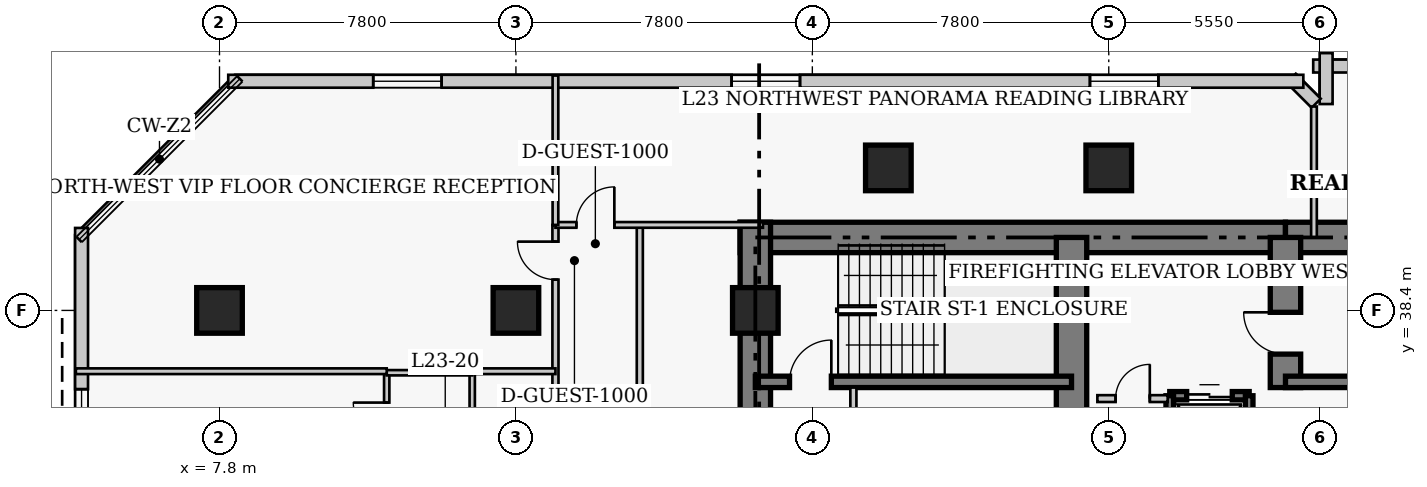
"""IFC4 building model, lengths in metres.
Left out: names, types, materials, properties, quantities, classifications, styles, units other than length and angle.
Written with IfcOpenShell. Run it as: python <this file> out.ifc"""

import sys

from ifc_helpers import new_model, si_unit, direction, frame, frame_2d, origin, origin_2d, place, context, subcontext, project, spatial, rectangle, extrude, element, fill, save


model = new_model("IFC4")
c1 = context("Model", 3, precision=1e-05, world=origin(), true_north=direction((0.0, 1.0)))
c2 = subcontext(c1, "Body", "Model", "MODEL_VIEW")
j1 = project(units=[si_unit("LENGTHUNIT", "METRE"), si_unit("PLANEANGLEUNIT", "RADIAN")], contexts=[c1])
p1 = place(None, origin())
s1 = spatial("IfcSite", under=j1, at=p1, CompositionType="ELEMENT")
p2 = place(p1, origin())
s2 = spatial("IfcBuilding", under=s1, at=p2, CompositionType="ELEMENT")
p3 = place(p2, frame((0.0, 0.0, 95.6)))
s3 = spatial("IfcBuildingStorey", under=s2, at=p3, CompositionType="ELEMENT", Elevation=95.6)
p4 = place(p3, frame((21.5, 40.32, 0.0), z_axis=(0.0, 0.0, 1.0), x_axis=(1.0, 0.0, 0.0)))
e1 = element("IfcWall", 1, at=p4, inside=s3, PredefinedType="SHEAR", context=c2, shape_type="SweptSolid", body=[
    extrude(rectangle(XDim=14.35, YDim=0.8, at=frame_2d((7.175, 0.0))), origin(), (0.0, 0.0, 1.0), 3.8),
])
p5 = place(p3, frame((35.85, 40.32, 0.0), z_axis=(0.0, 0.0, 1.0), x_axis=(1.0, 0.0, 0.0)))
e2 = element("IfcWall", 2, at=p5, inside=s3, PredefinedType="SHEAR", context=c2, shape_type="SweptSolid", body=[
    extrude(rectangle(XDim=12.6, YDim=0.8, at=frame_2d((6.3, 0.0))), origin(), (0.0, 0.0, 1.0), 3.8),
])
p6 = place(p3, frame((21.9, 27.05, 0.0), z_axis=(0.0, 0.0, 1.0), x_axis=(0.0, 1.0, 0.0)))
e3 = element("IfcWall", 3, at=p6, inside=s3, PredefinedType="SHEAR", context=c2, shape_type="SweptSolid", body=[
    extrude(rectangle(XDim=13.67, YDim=0.8, at=frame_2d((6.835, 0.0))), origin(), (0.0, 0.0, 1.0), 3.8),
])
p7 = place(p3, frame((30.22, 33.15, 0.0), z_axis=(0.0, 0.0, 1.0), x_axis=(0.0, 1.0, 0.0)))
e4 = element("IfcWall", 4, at=p7, inside=s3, PredefinedType="SHEAR", context=c2, shape_type="SweptSolid", body=[
    extrude(rectangle(XDim=7.17, YDim=0.8, at=frame_2d((3.585, 0.0))), origin(), (0.0, 0.0, 1.0), 3.8),
])
p8 = place(p3, frame((35.85, 36.37, 0.0), z_axis=(0.0, 0.0, 1.0), x_axis=(0.0, 1.0, 0.0)))
e5 = element("IfcWall", 5, at=p8, inside=s3, PredefinedType="SHEAR", context=c2, shape_type="SweptSolid", body=[
    extrude(rectangle(XDim=3.95, YDim=0.8, at=frame_2d((1.975, 0.0))), origin(), (0.0, 0.0, 1.0), 3.8),
])
p9 = place(p8, frame((0.88, 0.0, 0.0)))
e6 = element("IfcOpeningElement", 6, at=p9, cuts=e5, PredefinedType="OPENING", context=c2, shape_type="SweptSolid", body=[
    extrude(rectangle(XDim=1.1, YDim=2.15, at=frame_2d((0.55, 1.075))), frame((0.0, 0.41, 0.0), z_axis=(0.0, -1.0, 0.0), x_axis=(1.0, 0.0, 0.0)), (0.0, 0.0, 1.0), 0.82),
])
p10 = place(p3, frame((21.9, 36.52, 0.0), z_axis=(0.0, 0.0, 1.0), x_axis=(1.0, 0.0, 0.0)))
e7 = element("IfcWall", 7, at=p10, inside=s3, PredefinedType="SHEAR", context=c2, shape_type="SweptSolid", body=[
    extrude(rectangle(XDim=8.32, YDim=0.3, at=frame_2d((4.16, 0.0))), origin(), (0.0, 0.0, 1.0), 3.8),
])
p11 = place(p10, frame((0.9, 0.0, 0.0)))
e8 = element("IfcOpeningElement", 8, at=p11, cuts=e7, PredefinedType="OPENING", context=c2, shape_type="SweptSolid", body=[
    extrude(rectangle(XDim=1.1, YDim=2.15, at=frame_2d((0.55, 1.075))), frame((0.0, 0.16, 0.0), z_axis=(0.0, -1.0, 0.0), x_axis=(1.0, 0.0, 0.0)), (0.0, 0.0, 1.0), 0.32),
])
p12 = place(p3, frame((35.85, 36.52, 0.0), z_axis=(0.0, 0.0, 1.0), x_axis=(1.0, 0.0, 0.0)))
e9 = element("IfcWall", 9, at=p12, inside=s3, PredefinedType="SHEAR", context=c2, shape_type="SweptSolid", body=[
    extrude(rectangle(XDim=8.33, YDim=0.3, at=frame_2d((4.165, 0.0))), origin(), (0.0, 0.0, 1.0), 3.8),
])
for number, where, z_axis, x_axis in (
    (10, (7.8, 38.4, 0.0), (0.0, 0.0, 1.0), (1.0, 0.0, 0.0)),
    (11, (15.6, 38.4, 0.0), (0.0, 0.0, 1.0), (1.0, 0.0, 0.0)),
    (12, (21.9, 38.4, 0.0), (0.0, 0.0, 1.0), (1.0, 0.0, 0.0)),
    (13, (25.4, 42.15, 0.0), (0.0, 0.0, 1.0), (1.0, 0.0, 0.0)),
    (14, (31.2, 42.15, 0.0), (0.0, 0.0, 1.0), (1.0, 0.0, 0.0)),
):
    element("IfcColumn", number, at=place(p3, frame(where, z_axis=z_axis, x_axis=x_axis)), inside=s3, PredefinedType="COLUMN", context=c2, shape_type="SweptSolid", body=[
        extrude(rectangle(XDim=1.2, YDim=1.2, at=origin_2d()), origin(), (0.0, 0.0, 1.0), 3.8),
    ])
p13 = place(p3, frame((41.42, 44.83, 0.0), z_axis=(0.0, 0.0, 1.0), x_axis=(-1.0, 0.0, 0.0)))
e15 = element("IfcWall", 15, at=p13, inside=s3, PredefinedType="SOLIDWALL", context=c2, shape_type="SweptSolid", body=[
    extrude(rectangle(XDim=4.84, YDim=0.34, at=frame_2d((2.42, 0.0))), origin(), (0.0, 0.0, 1.0), 3.54),
])
p14 = place(p13, frame((1.52, 0.0, 0.85)))
e16 = element("IfcOpeningElement", 16, at=p14, cuts=e15, PredefinedType="OPENING", context=c2, shape_type="SweptSolid", body=[
    extrude(rectangle(XDim=1.8, YDim=1.8, at=frame_2d((0.9, 0.9))), frame((0.0, 0.18, 0.0), z_axis=(0.0, -1.0, 0.0), x_axis=(1.0, 0.0, 0.0)), (0.0, 0.0, 1.0), 0.36),
])
p15 = place(p3, frame((36.92, 45.17, 0.0), z_axis=(0.0, 0.0, 1.0), x_axis=(0.0, -1.0, 0.0)))
e17 = element("IfcWall", 17, at=p15, inside=s3, PredefinedType="SOLIDWALL", context=c2, shape_type="SweptSolid", body=[
    extrude(rectangle(XDim=1.34, YDim=0.34, at=frame_2d((0.67, 0.0))), origin(), (0.0, 0.0, 1.0), 3.54),
])
p16 = place(p3, frame((36.658, 43.852, 0.0), z_axis=(0.0, 0.0, 1.0), x_axis=(-0.707238225886, 0.706975312048, 0.0)))
e18 = element("IfcWall", 18, at=p16, inside=s3, PredefinedType="SOLIDWALL", context=c2, shape_type="SweptSolid", body=[
    extrude(rectangle(XDim=0.929, YDim=0.34, at=frame_2d((0.464, 0.0))), origin(), (0.0, 0.0, 1.0), 3.54),
])
p17 = place(p3, frame((36.32, 44.43, 0.0), z_axis=(0.0, 0.0, 1.0), x_axis=(-1.0, 0.0, 0.0)))
e19 = element("IfcWall", 19, at=p17, inside=s3, PredefinedType="SOLIDWALL", context=c2, shape_type="SweptSolid", body=[
    extrude(rectangle(XDim=28.29, YDim=0.34, at=frame_2d((14.145, 0.0))), origin(), (0.0, 0.0, 1.0), 3.54),
])
p18 = place(p17, frame((3.815, 0.0, 0.85)))
e20 = element("IfcOpeningElement", 20, at=p18, cuts=e19, PredefinedType="OPENING", context=c2, shape_type="SweptSolid", body=[
    extrude(rectangle(XDim=1.8, YDim=1.8, at=frame_2d((0.9, 0.9))), frame((0.0, 0.18, 0.0), z_axis=(0.0, -1.0, 0.0), x_axis=(1.0, 0.0, 0.0)), (0.0, 0.0, 1.0), 0.36),
])
p19 = place(p17, frame((13.245, 0.0, 0.85)))
e21 = element("IfcOpeningElement", 21, at=p19, cuts=e19, PredefinedType="OPENING", context=c2, shape_type="SweptSolid", body=[
    extrude(rectangle(XDim=1.8, YDim=1.8, at=frame_2d((0.9, 0.9))), frame((0.0, 0.18, 0.0), z_axis=(0.0, -1.0, 0.0), x_axis=(1.0, 0.0, 0.0)), (0.0, 0.0, 1.0), 0.36),
])
p20 = place(p17, frame((22.675, 0.0, 0.85)))
e22 = element("IfcOpeningElement", 22, at=p20, cuts=e19, PredefinedType="OPENING", context=c2, shape_type="SweptSolid", body=[
    extrude(rectangle(XDim=1.8, YDim=1.8, at=frame_2d((0.9, 0.9))), frame((0.0, 0.18, 0.0), z_axis=(0.0, -1.0, 0.0), x_axis=(1.0, 0.0, 0.0)), (0.0, 0.0, 1.0), 0.36),
])
p21 = place(p3, frame((4.17, 40.57, 0.0), z_axis=(0.0, 0.0, 1.0), x_axis=(0.0, -1.0, 0.0)))
e23 = element("IfcWall", 23, at=p21, inside=s3, PredefinedType="SOLIDWALL", context=c2, shape_type="SweptSolid", body=[
    extrude(rectangle(XDim=31.94, YDim=0.34, at=frame_2d((15.97, 0.0))), origin(), (0.0, 0.0, 1.0), 3.54),
])
p22 = place(p21, frame((4.242, 0.0, 0.85)))
e24 = element("IfcOpeningElement", 24, at=p22, cuts=e23, PredefinedType="OPENING", context=c2, shape_type="SweptSolid", body=[
    extrude(rectangle(XDim=1.8, YDim=1.8, at=frame_2d((0.9, 0.9))), frame((0.0, 0.18, 0.0), z_axis=(0.0, -1.0, 0.0), x_axis=(1.0, 0.0, 0.0)), (0.0, 0.0, 1.0), 0.36),
])
p23 = place(p21, frame((12.228, 0.0, 0.85)))
e25 = element("IfcOpeningElement", 25, at=p23, cuts=e23, PredefinedType="OPENING", context=c2, shape_type="SweptSolid", body=[
    extrude(rectangle(XDim=1.8, YDim=1.8, at=frame_2d((0.9, 0.9))), frame((0.0, 0.18, 0.0), z_axis=(0.0, -1.0, 0.0), x_axis=(1.0, 0.0, 0.0)), (0.0, 0.0, 1.0), 0.36),
])
p24 = place(p21, frame((18.413, 0.0, 0.85)))
e26 = element("IfcOpeningElement", 26, at=p24, cuts=e23, PredefinedType="OPENING", context=c2, shape_type="SweptSolid", body=[
    extrude(rectangle(XDim=1.8, YDim=1.8, at=frame_2d((0.9, 0.9))), frame((0.0, 0.18, 0.0), z_axis=(0.0, -1.0, 0.0), x_axis=(1.0, 0.0, 0.0)), (0.0, 0.0, 1.0), 0.36),
])
p25 = place(p21, frame((27.048, 0.0, 0.85)))
e27 = element("IfcOpeningElement", 27, at=p25, cuts=e23, PredefinedType="OPENING", context=c2, shape_type="SweptSolid", body=[
    extrude(rectangle(XDim=1.8, YDim=1.8, at=frame_2d((0.9, 0.9))), frame((0.0, 0.18, 0.0), z_axis=(0.0, -1.0, 0.0), x_axis=(1.0, 0.0, 0.0)), (0.0, 0.0, 1.0), 0.36),
])
p26 = place(p3, frame((32.805, 36.155, 0.0), z_axis=(0.0, 0.0, 1.0), x_axis=(1.0, 0.0, 0.0)))
e28 = element("IfcWall", 28, at=p26, inside=s3, PredefinedType="SHEAR", context=c2, shape_type="SweptSolid", body=[
    extrude(rectangle(XDim=2.09, YDim=0.22, at=frame_2d((1.045, 0.0))), origin(), (0.0, 0.0, 1.0), 3.8),
])
p27 = place(p26, frame((0.445, 0.0, 0.0)))
e29 = element("IfcOpeningElement", 29, at=p27, cuts=e28, PredefinedType="OPENING", context=c2, shape_type="SweptSolid", body=[
    extrude(rectangle(XDim=1.2, YDim=2.15, at=frame_2d((0.6, 1.075))), frame((0.0, 0.12, 0.0), z_axis=(0.0, -1.0, 0.0), x_axis=(1.0, 0.0, 0.0)), (0.0, 0.0, 1.0), 0.24),
])
for number, where, z_axis, x_axis in (
    (30, (32.805, 33.245, 0.0), (0.0, 0.0, 1.0), (0.0, 1.0, 0.0)),
    (31, (34.895, 33.245, 0.0), (0.0, 0.0, 1.0), (0.0, 1.0, 0.0)),
):
    element("IfcWall", number, at=place(p3, frame(where, z_axis=z_axis, x_axis=x_axis)), inside=s3, PredefinedType="SHEAR", context=c2, shape_type="SweptSolid", body=[
        extrude(rectangle(XDim=2.91, YDim=0.2, at=frame_2d((1.455, 0.0))), origin(), (0.0, 0.0, 1.0), 3.8),
    ])
p28 = place(p3, frame((30.9, 36.08, 0.0), z_axis=(0.0, 0.0, 1.0), x_axis=(1.0, 0.0, 0.0)))
e32 = element("IfcWall", 32, at=p28, inside=s3, PredefinedType="PARTITIONING", context=c2, shape_type="SweptSolid", body=[
    extrude(rectangle(XDim=1.85, YDim=0.18, at=frame_2d((0.925, 0.0))), origin(), (0.0, 0.0, 1.0), 3.54),
])
p29 = place(p28, frame((0.48, 0.0, 0.0)))
e33 = element("IfcOpeningElement", 33, at=p29, cuts=e32, PredefinedType="OPENING", context=c2, shape_type="SweptSolid", body=[
    extrude(rectangle(XDim=0.9, YDim=2.15, at=frame_2d((0.45, 1.075))), frame((0.0, 0.1, 0.0), z_axis=(0.0, -1.0, 0.0), x_axis=(1.0, 0.0, 0.0)), (0.0, 0.0, 1.0), 0.2),
])
p30 = place(p3, frame((24.48, 32.8, 0.0), z_axis=(0.0, 0.0, 1.0), x_axis=(0.0, 1.0, 0.0)))
e34 = element("IfcWall", 34, at=p30, inside=s3, PredefinedType="PARTITIONING", context=c2, shape_type="SweptSolid", body=[
    extrude(rectangle(XDim=3.57, YDim=0.16, at=frame_2d((1.785, 0.0))), origin(), (0.0, 0.0, 1.0), 3.54),
])
p31 = place(p30, frame((1.604, 0.0, 0.0)))
e35 = element("IfcOpeningElement", 35, at=p31, cuts=e34, PredefinedType="OPENING", context=c2, shape_type="SweptSolid", body=[
    extrude(rectangle(XDim=0.9, YDim=2.1, at=frame_2d((0.45, 1.05))), frame((0.0, 0.09, 0.0), z_axis=(0.0, -1.0, 0.0), x_axis=(1.0, 0.0, 0.0)), (0.0, 0.0, 1.0), 0.18),
])
p32 = place(p3, frame((16.64, 6.65, 0.0), z_axis=(0.0, 0.0, 1.0), x_axis=(0.0, 1.0, 0.0)))
e36 = element("IfcWall", 36, at=p32, inside=s3, PredefinedType="PARTITIONING", context=c2, shape_type="SweptSolid", body=[
    extrude(rectangle(XDim=34.0, YDim=0.16, at=frame_2d((17.0, 0.0))), origin(), (0.0, 0.0, 1.0), 3.54),
])
p33 = place(p32, frame((1.8, 0.0, 0.0)))
e37 = element("IfcOpeningElement", 37, at=p33, cuts=e36, PredefinedType="OPENING", context=c2, shape_type="SweptSolid", body=[
    extrude(rectangle(XDim=0.95, YDim=2.1, at=frame_2d((0.475, 1.05))), frame((0.0, 0.09, 0.0), z_axis=(0.0, -1.0, 0.0), x_axis=(1.0, 0.0, 0.0)), (0.0, 0.0, 1.0), 0.18),
])
p34 = place(p32, frame((8.475, 0.0, 0.0)))
e38 = element("IfcOpeningElement", 38, at=p34, cuts=e36, PredefinedType="OPENING", context=c2, shape_type="SweptSolid", body=[
    extrude(rectangle(XDim=0.95, YDim=2.1, at=frame_2d((0.475, 1.05))), frame((0.0, 0.09, 0.0), z_axis=(0.0, -1.0, 0.0), x_axis=(1.0, 0.0, 0.0)), (0.0, 0.0, 1.0), 0.18),
])
p35 = place(p32, frame((17.275, 0.0, 0.0)))
e39 = element("IfcOpeningElement", 39, at=p35, cuts=e36, PredefinedType="OPENING", context=c2, shape_type="SweptSolid", body=[
    extrude(rectangle(XDim=0.95, YDim=2.1, at=frame_2d((0.475, 1.05))), frame((0.0, 0.09, 0.0), z_axis=(0.0, -1.0, 0.0), x_axis=(1.0, 0.0, 0.0)), (0.0, 0.0, 1.0), 0.18),
])
p36 = place(p32, frame((25.675, 0.0, 0.0)))
e40 = element("IfcOpeningElement", 40, at=p36, cuts=e36, PredefinedType="OPENING", context=c2, shape_type="SweptSolid", body=[
    extrude(rectangle(XDim=0.95, YDim=2.1, at=frame_2d((0.475, 1.05))), frame((0.0, 0.09, 0.0), z_axis=(0.0, -1.0, 0.0), x_axis=(1.0, 0.0, 0.0)), (0.0, 0.0, 1.0), 0.18),
])
p37 = place(p32, frame((32.56, 0.0, 0.0)))
e41 = element("IfcOpeningElement", 41, at=p37, cuts=e36, PredefinedType="OPENING", context=c2, shape_type="SweptSolid", body=[
    extrude(rectangle(XDim=1.0, YDim=2.15, at=frame_2d((0.5, 1.075))), frame((0.0, 0.09, 0.0), z_axis=(0.0, -1.0, 0.0), x_axis=(1.0, 0.0, 0.0)), (0.0, 0.0, 1.0), 0.18),
])
p38 = place(p3, frame((18.86, 35.02, 0.0), z_axis=(0.0, 0.0, 1.0), x_axis=(0.0, 1.0, 0.0)))
e42 = element("IfcWall", 42, at=p38, inside=s3, PredefinedType="PARTITIONING", context=c2, shape_type="SweptSolid", body=[
    extrude(rectangle(XDim=5.63, YDim=0.16, at=frame_2d((2.815, 0.0))), origin(), (0.0, 0.0, 1.0), 3.54),
])
p39 = place(p3, frame((16.64, 40.65, 0.0), z_axis=(0.0, 0.0, 1.0), x_axis=(1.0, 0.0, 0.0)))
e43 = element("IfcWall", 43, at=p39, inside=s3, PredefinedType="PARTITIONING", context=c2, shape_type="SweptSolid", body=[
    extrude(rectangle(XDim=5.46, YDim=0.15, at=frame_2d((2.73, 0.0))), origin(), (0.0, 0.0, 1.0), 3.54),
])
p40 = place(p39, frame((0.55, 0.0, 0.0)))
e44 = element("IfcOpeningElement", 44, at=p40, cuts=e43, PredefinedType="OPENING", context=c2, shape_type="SweptSolid", body=[
    extrude(rectangle(XDim=1.0, YDim=2.15, at=frame_2d((0.5, 1.075))), frame((0.0, 0.085, 0.0), z_axis=(0.0, -1.0, 0.0), x_axis=(1.0, 0.0, 0.0)), (0.0, 0.0, 1.0), 0.17),
])
p41 = place(p3, frame((16.64, 40.65, 0.0), z_axis=(0.0, 0.0, 1.0), x_axis=(0.0, 1.0, 0.0)))
e45 = element("IfcWall", 45, at=p41, inside=s3, PredefinedType="PARTITIONING", context=c2, shape_type="SweptSolid", body=[
    extrude(rectangle(XDim=3.93, YDim=0.15, at=frame_2d((1.965, 0.0))), origin(), (0.0, 0.0, 1.0), 3.54),
])
p42 = place(p3, frame((36.6, 40.32, 0.0), z_axis=(0.0, 0.0, 1.0), x_axis=(0.0, 1.0, 0.0)))
e46 = element("IfcWall", 46, at=p42, inside=s3, PredefinedType="PARTITIONING", context=c2, shape_type="SweptSolid", body=[
    extrude(rectangle(XDim=3.445, YDim=0.15, at=frame_2d((1.723, 0.0))), origin(), (0.0, 0.0, 1.0), 3.54),
])
p43 = place(p3, frame((12.2, 34.31, 0.0), z_axis=(0.0, 0.0, 1.0), x_axis=(0.0, 1.0, 0.0)))
e47 = element("IfcWall", 47, at=p43, inside=s3, PredefinedType="PLUMBINGWALL", context=c2, shape_type="SweptSolid", body=[
    extrude(rectangle(XDim=2.45, YDim=0.14, at=frame_2d((1.225, 0.0))), origin(), (0.0, 0.0, 1.0), 3.54),
])
p44 = place(p43, frame((0.785, 0.0, 0.0)))
e48 = element("IfcOpeningElement", 48, at=p44, cuts=e47, PredefinedType="OPENING", context=c2, shape_type="SweptSolid", body=[
    extrude(rectangle(XDim=0.88, YDim=2.05, at=frame_2d((0.44, 1.025))), frame((0.0, 0.08, 0.0), z_axis=(0.0, -1.0, 0.0), x_axis=(1.0, 0.0, 0.0)), (0.0, 0.0, 1.0), 0.16),
])
p45 = place(p3, frame((14.45, 34.31, 0.0), z_axis=(0.0, 0.0, 1.0), x_axis=(0.0, 1.0, 0.0)))
e49 = element("IfcWall", 49, at=p45, inside=s3, PredefinedType="PLUMBINGWALL", context=c2, shape_type="SweptSolid", body=[
    extrude(rectangle(XDim=2.45, YDim=0.14, at=frame_2d((1.225, 0.0))), origin(), (0.0, 0.0, 1.0), 3.54),
])
p46 = place(p3, frame((12.2, 36.76, 0.0), z_axis=(0.0, 0.0, 1.0), x_axis=(1.0, 0.0, 0.0)))
e50 = element("IfcWall", 50, at=p46, inside=s3, PredefinedType="PLUMBINGWALL", context=c2, shape_type="SweptSolid", body=[
    extrude(rectangle(XDim=2.25, YDim=0.14, at=frame_2d((1.125, 0.0))), origin(), (0.0, 0.0, 1.0), 3.54),
])
p47 = place(p3, frame((4.02, 36.8, 0.0), z_axis=(0.0, 0.0, 1.0), x_axis=(1.0, 0.0, 0.0)))
e51 = element("IfcWall", 51, at=p47, inside=s3, PredefinedType="PARTITIONING", context=c2, shape_type="SweptSolid", body=[
    extrude(rectangle(XDim=8.18, YDim=0.15, at=frame_2d((4.09, 0.0))), origin(), (0.0, 0.0, 1.0), 3.54),
])
p48 = place(p3, frame((14.45, 36.8, 0.0), z_axis=(0.0, 0.0, 1.0), x_axis=(1.0, 0.0, 0.0)))
e52 = element("IfcWall", 52, at=p48, inside=s3, PredefinedType="PARTITIONING", context=c2, shape_type="SweptSolid", body=[
    extrude(rectangle(XDim=2.19, YDim=0.15, at=frame_2d((1.095, 0.0))), origin(), (0.0, 0.0, 1.0), 3.54),
])
p49 = place(p18, origin())
e53 = element("IfcWindow", 53, at=p49, inside=s3, PartitioningType="SINGLE_PANEL", PredefinedType="WINDOW", context=c2, shape_type="SweptSolid", body=[
    extrude(rectangle(XDim=1.8, YDim=1.8, at=frame_2d((0.9, 0.9))), frame((0.0, 0.03, 0.0), z_axis=(0.0, -1.0, 0.0), x_axis=(1.0, 0.0, 0.0)), (0.0, 0.0, 1.0), 0.06),
])
fill(e20, e53)
p50 = place(p19, origin())
e54 = element("IfcWindow", 54, at=p50, inside=s3, PartitioningType="SINGLE_PANEL", PredefinedType="WINDOW", context=c2, shape_type="SweptSolid", body=[
    extrude(rectangle(XDim=1.8, YDim=1.8, at=frame_2d((0.9, 0.9))), frame((0.0, 0.03, 0.0), z_axis=(0.0, -1.0, 0.0), x_axis=(1.0, 0.0, 0.0)), (0.0, 0.0, 1.0), 0.06),
])
fill(e21, e54)
p51 = place(p20, origin())
e55 = element("IfcWindow", 55, at=p51, inside=s3, PartitioningType="SINGLE_PANEL", PredefinedType="WINDOW", context=c2, shape_type="SweptSolid", body=[
    extrude(rectangle(XDim=1.8, YDim=1.8, at=frame_2d((0.9, 0.9))), frame((0.0, 0.03, 0.0), z_axis=(0.0, -1.0, 0.0), x_axis=(1.0, 0.0, 0.0)), (0.0, 0.0, 1.0), 0.06),
])
fill(e22, e55)
p52 = place(p22, origin())
e56 = element("IfcWindow", 56, at=p52, inside=s3, PartitioningType="SINGLE_PANEL", PredefinedType="WINDOW", context=c2, shape_type="SweptSolid", body=[
    extrude(rectangle(XDim=1.8, YDim=1.8, at=frame_2d((0.9, 0.9))), frame((0.0, 0.03, 0.0), z_axis=(0.0, -1.0, 0.0), x_axis=(1.0, 0.0, 0.0)), (0.0, 0.0, 1.0), 0.06),
])
fill(e24, e56)
p53 = place(p27, origin())
e57 = element("IfcDoor", 57, at=p53, inside=s3, OperationType="DOUBLE_DOOR_SLIDING", PredefinedType="DOOR", context=c2, shape_type="SweptSolid", body=[
    extrude(rectangle(XDim=1.2, YDim=2.15, at=frame_2d((0.6, 1.075))), frame((0.0, 0.025, 0.0), z_axis=(0.0, -1.0, 0.0), x_axis=(1.0, 0.0, 0.0)), (0.0, 0.0, 1.0), 0.05),
])
fill(e29, e57)
p54 = place(p29, origin())
e58 = element("IfcDoor", 58, at=p54, inside=s3, OperationType="SINGLE_SWING_RIGHT", PredefinedType="DOOR", context=c2, shape_type="SweptSolid", body=[
    extrude(rectangle(XDim=0.9, YDim=2.15, at=frame_2d((0.45, 1.075))), frame((0.0, 0.025, 0.0), z_axis=(0.0, -1.0, 0.0), x_axis=(1.0, 0.0, 0.0)), (0.0, 0.0, 1.0), 0.05),
])
fill(e33, e58)
p55 = place(p40, origin())
e59 = element("IfcDoor", 59, at=p55, inside=s3, OperationType="SINGLE_SWING_RIGHT", PredefinedType="DOOR", context=c2, shape_type="SweptSolid", body=[
    extrude(rectangle(XDim=1.0, YDim=2.15, at=frame_2d((0.5, 1.075))), frame((0.0, 0.025, 0.0), z_axis=(0.0, -1.0, 0.0), x_axis=(1.0, 0.0, 0.0)), (0.0, 0.0, 1.0), 0.05),
])
fill(e44, e59)
p56 = place(p44, origin())
e60 = element("IfcDoor", 60, at=p56, inside=s3, OperationType="SINGLE_SWING_RIGHT", PredefinedType="DOOR", context=c2, shape_type="SweptSolid", body=[
    extrude(rectangle(XDim=0.88, YDim=2.05, at=frame_2d((0.44, 1.025))), frame((0.0, 0.025, 0.0), z_axis=(0.0, -1.0, 0.0), x_axis=(1.0, 0.0, 0.0)), (0.0, 0.0, 1.0), 0.05),
])
fill(e48, e60)
p57 = place(p37, origin())
e61 = element("IfcDoor", 61, at=p57, inside=s3, OperationType="SINGLE_SWING_RIGHT", PredefinedType="DOOR", context=c2, shape_type="SweptSolid", body=[
    extrude(rectangle(XDim=1.0, YDim=2.15, at=frame_2d((0.5, 1.075))), frame((0.0, 0.025, 0.0), z_axis=(0.0, -1.0, 0.0), x_axis=(1.0, 0.0, 0.0)), (0.0, 0.0, 1.0), 0.05),
])
fill(e41, e61)
p58 = place(p11, origin())
e62 = element("IfcDoor", 62, at=p58, inside=s3, OperationType="SINGLE_SWING_RIGHT", PredefinedType="DOOR", context=c2, shape_type="SweptSolid", body=[
    extrude(rectangle(XDim=1.1, YDim=2.15, at=frame_2d((0.55, 1.075))), frame((0.0, 0.025, 0.0), z_axis=(0.0, -1.0, 0.0), x_axis=(1.0, 0.0, 0.0)), (0.0, 0.0, 1.0), 0.05),
])
fill(e8, e62)
p59 = place(p9, origin())
e63 = element("IfcDoor", 63, at=p59, inside=s3, OperationType="SINGLE_SWING_RIGHT", PredefinedType="DOOR", context=c2, shape_type="SweptSolid", body=[
    extrude(rectangle(XDim=1.1, YDim=2.15, at=frame_2d((0.55, 1.075))), frame((0.0, 0.025, 0.0), z_axis=(0.0, -1.0, 0.0), x_axis=(1.0, 0.0, 0.0)), (0.0, 0.0, 1.0), 0.05),
])
fill(e6, e63)
save(model, sys.argv[1])
